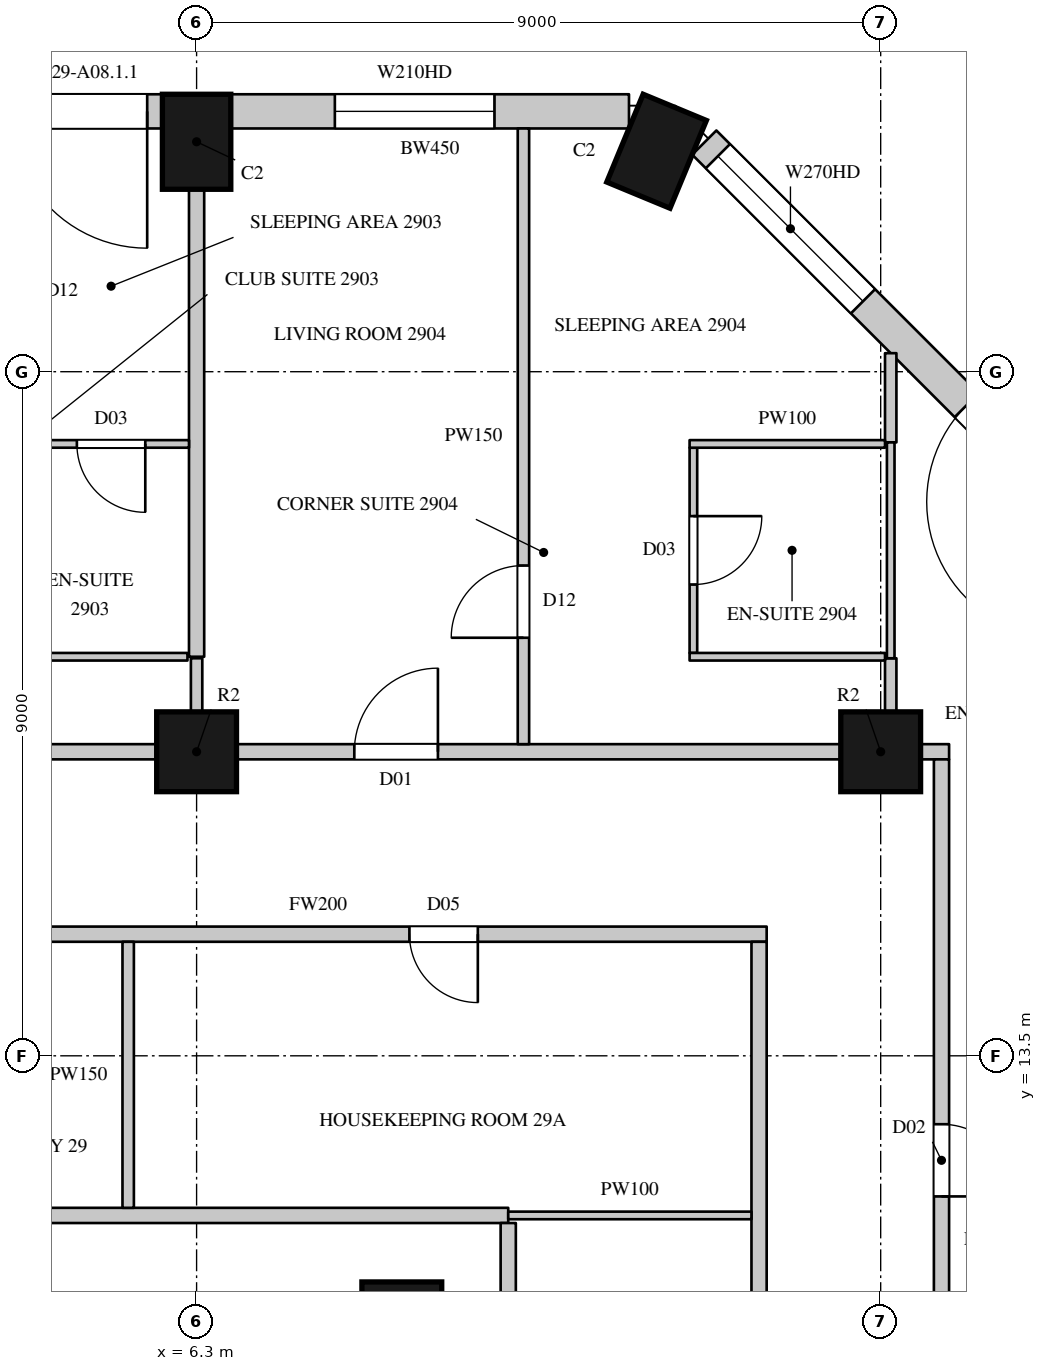
"""IFC4 building model, lengths in metres.
Left out: names, types, materials, properties, quantities, classifications, styles, units other than length and angle.
Written with IfcOpenShell. Run it as: python <this file> out.ifc"""

import sys

from ifc_helpers import new_model, si_unit, direction, frame, frame_2d, origin, origin_2d, place, context, subcontext, project, spatial, rectangle, circle, extrude, element, fill, save


model = new_model("IFC4")
c1 = context("Model", 3, precision=1e-05, world=origin(), true_north=direction((0.0, 1.0)))
c2 = subcontext(c1, "Body", "Model", "MODEL_VIEW")
j1 = project(units=[si_unit("LENGTHUNIT", "METRE"), si_unit("PLANEANGLEUNIT", "RADIAN")], contexts=[c1])
p1 = place(None, origin())
s1 = spatial("IfcSite", under=j1, at=p1, CompositionType="ELEMENT")
p2 = place(p1, origin())
s2 = spatial("IfcBuilding", under=s1, at=p2, CompositionType="ELEMENT")
p3 = place(p2, frame((0.0, 0.0, 134.7)))
s3 = spatial("IfcBuildingStorey", under=s2, at=p3, CompositionType="ELEMENT", Elevation=134.7)
for number, where, z_axis, x_axis in (
    (1, (12.352, 25.4, 0.0), (0.0, 0.0, 1.0), (-0.924, 0.383, 0.0)),
    (2, (6.3, 25.525, 0.0), (0.0, 0.0, 1.0), (-1.0, 0.0, 0.0)),
):
    element("IfcColumn", number, at=place(p3, frame(where, z_axis=z_axis, x_axis=x_axis)), inside=s3, PredefinedType="COLUMN", context=c2, shape_type="SweptSolid", body=[
        extrude(rectangle(XDim=0.9, YDim=1.25, at=origin_2d()), origin(), (0.0, 0.0, 1.0), 3.6),
    ])
for number, where, z_axis, x_axis in (
    (3, (6.3, 17.5, 0.0), (0.0, 0.0, 1.0), (1.0, 0.0, 0.0)),
    (4, (15.3, 17.5, 0.0), (0.0, 0.0, 1.0), (1.0, 0.0, 0.0)),
    (5, (9.0, 10.0, 0.0), (0.0, 0.0, 1.0), (1.0, 0.0, 0.0)),
):
    element("IfcColumn", number, at=place(p3, frame(where, z_axis=z_axis, x_axis=x_axis)), inside=s3, PredefinedType="COLUMN", context=c2, shape_type="SweptSolid", body=[
        extrude(circle(Radius=0.525, at=origin_2d()), origin(), (0.0, 0.0, 1.0), 3.6),
    ])
p4 = place(p3, frame((18.229, 20.265, 0.0), z_axis=(0.0, 0.0, 1.0), x_axis=(-0.707106781187, 0.707106781187, 0.0)))
e6 = element("IfcWall", 6, at=p4, inside=s3, PredefinedType="SOLIDWALL", context=c2, shape_type="SweptSolid", body=[
    extrude(rectangle(XDim=7.424, YDim=0.45, at=frame_2d((3.712, 0.0))), origin(), (0.0, 0.0, 1.0), 3.3),
])
p5 = place(p4, frame((0.74, 0.0, 0.0)))
e7 = element("IfcOpeningElement", 7, at=p5, cuts=e6, PredefinedType="OPENING", context=c2, shape_type="SweptSolid", body=[
    extrude(rectangle(XDim=1.8, YDim=2.4, at=frame_2d((0.9, 1.2))), frame((0.0, 0.235, 0.0), z_axis=(0.0, -1.0, 0.0), x_axis=(1.0, 0.0, 0.0)), (0.0, 0.0, 1.0), 0.47),
])
p6 = place(p4, frame((4.471, 0.0, 1.05)))
e8 = element("IfcOpeningElement", 8, at=p6, cuts=e6, PredefinedType="OPENING", context=c2, shape_type="SweptSolid", body=[
    extrude(rectangle(XDim=2.7, YDim=2.0, at=frame_2d((1.35, 1.0))), frame((0.0, 0.235, 0.0), z_axis=(0.0, -1.0, 0.0), x_axis=(1.0, 0.0, 0.0)), (0.0, 0.0, 1.0), 0.47),
])
p7 = place(p3, frame((11.989, 25.925, 0.0), z_axis=(0.0, 0.0, 1.0), x_axis=(-1.0, 0.0, 0.0)))
e9 = element("IfcWall", 9, at=p7, inside=s3, PredefinedType="SOLIDWALL", context=c2, shape_type="SweptSolid", body=[
    extrude(rectangle(XDim=5.239, YDim=0.45, at=frame_2d((2.619, 0.0))), origin(), (0.0, 0.0, 1.0), 3.3),
])
p8 = place(p7, frame((1.77, 0.0, 1.05)))
e10 = element("IfcOpeningElement", 10, at=p8, cuts=e9, PredefinedType="OPENING", context=c2, shape_type="SweptSolid", body=[
    extrude(rectangle(XDim=2.1, YDim=2.0, at=frame_2d((1.05, 1.0))), frame((0.0, 0.235, 0.0), z_axis=(0.0, -1.0, 0.0), x_axis=(1.0, 0.0, 0.0)), (0.0, 0.0, 1.0), 0.47),
])
p9 = place(p3, frame((5.85, 25.925, 0.0), z_axis=(0.0, 0.0, 1.0), x_axis=(-1.0, 0.0, 0.0)))
e11 = element("IfcWall", 11, at=p9, inside=s3, PredefinedType="SOLIDWALL", context=c2, shape_type="SweptSolid", body=[
    extrude(rectangle(XDim=8.1, YDim=0.45, at=frame_2d((4.05, 0.0))), origin(), (0.0, 0.0, 1.0), 3.3),
])
p10 = place(p9, frame((0.2, 0.0, 0.0)))
e12 = element("IfcOpeningElement", 12, at=p10, cuts=e11, PredefinedType="OPENING", context=c2, shape_type="SweptSolid", body=[
    extrude(rectangle(XDim=1.8, YDim=2.4, at=frame_2d((0.9, 1.2))), frame((0.0, 0.235, 0.0), z_axis=(0.0, -1.0, 0.0), x_axis=(1.0, 0.0, 0.0)), (0.0, 0.0, 1.0), 0.47),
])
p11 = place(p9, frame((2.2, 0.0, 1.05)))
e13 = element("IfcOpeningElement", 13, at=p11, cuts=e11, PredefinedType="OPENING", context=c2, shape_type="SweptSolid", body=[
    extrude(rectangle(XDim=1.2, YDim=2.0, at=frame_2d((0.6, 1.0))), frame((0.0, 0.235, 0.0), z_axis=(0.0, -1.0, 0.0), x_axis=(1.0, 0.0, 0.0)), (0.0, 0.0, 1.0), 0.47),
])
p12 = place(p9, frame((4.7, 0.0, 0.0)))
e14 = element("IfcOpeningElement", 14, at=p12, cuts=e11, PredefinedType="OPENING", context=c2, shape_type="SweptSolid", body=[
    extrude(rectangle(XDim=1.8, YDim=2.4, at=frame_2d((0.9, 1.2))), frame((0.0, 0.235, 0.0), z_axis=(0.0, -1.0, 0.0), x_axis=(1.0, 0.0, 0.0)), (0.0, 0.0, 1.0), 0.47),
])
p13 = place(p9, frame((6.7, 0.0, 1.05)))
e15 = element("IfcOpeningElement", 15, at=p13, cuts=e11, PredefinedType="OPENING", context=c2, shape_type="SweptSolid", body=[
    extrude(rectangle(XDim=1.2, YDim=2.0, at=frame_2d((0.6, 1.0))), frame((0.0, 0.235, 0.0), z_axis=(0.0, -1.0, 0.0), x_axis=(1.0, 0.0, 0.0)), (0.0, 0.0, 1.0), 0.47),
])
p14 = place(p3, frame((16.486, 23.529, 0.0), z_axis=(0.0, 0.0, 1.0), x_axis=(-0.707022305137, 0.707191247145, 0.0)))
e16 = element("IfcWall", 16, at=p14, inside=s3, PredefinedType="SOLIDWALL", context=c2, shape_type="SweptSolid", body=[
    extrude(rectangle(XDim=1.445, YDim=0.45, at=frame_2d((0.723, 0.0))), origin(), (0.0, 0.0, 1.0), 0.6),
])
p15 = place(p3, frame((-2.175, 17.5, 0.0), z_axis=(0.0, 0.0, 1.0), x_axis=(1.0, 0.0, 0.0)))
e17 = element("IfcWall", 17, at=p15, inside=s3, PredefinedType="PARTITIONING", context=c2, shape_type="SweptSolid", body=[
    extrude(rectangle(XDim=7.95, YDim=0.2, at=frame_2d((3.975, 0.0))), origin(), (0.0, 0.0, 1.0), 2.75),
])
p16 = place(p15, frame((4.55, 0.0, 0.0)))
e18 = element("IfcOpeningElement", 18, at=p16, cuts=e17, PredefinedType="OPENING", context=c2, shape_type="SweptSolid", body=[
    extrude(rectangle(XDim=1.1, YDim=2.4, at=frame_2d((0.55, 1.2))), frame((0.0, 0.11, 0.0), z_axis=(0.0, -1.0, 0.0), x_axis=(1.0, 0.0, 0.0)), (0.0, 0.0, 1.0), 0.22),
])
p17 = place(p3, frame((6.825, 17.5, 0.0), z_axis=(0.0, 0.0, 1.0), x_axis=(1.0, 0.0, 0.0)))
e19 = element("IfcWall", 19, at=p17, inside=s3, PredefinedType="PARTITIONING", context=c2, shape_type="SweptSolid", body=[
    extrude(rectangle(XDim=7.95, YDim=0.2, at=frame_2d((3.975, 0.0))), origin(), (0.0, 0.0, 1.0), 2.75),
])
p18 = place(p17, frame((1.55, 0.0, 0.0)))
e20 = element("IfcOpeningElement", 20, at=p18, cuts=e19, PredefinedType="OPENING", context=c2, shape_type="SweptSolid", body=[
    extrude(rectangle(XDim=1.1, YDim=2.4, at=frame_2d((0.55, 1.2))), frame((0.0, 0.11, 0.0), z_axis=(0.0, -1.0, 0.0), x_axis=(1.0, 0.0, 0.0)), (0.0, 0.0, 1.0), 0.22),
])
p19 = place(p3, frame((15.825, 17.5, 0.0), z_axis=(0.0, 0.0, 1.0), x_axis=(1.0, 0.0, 0.0)))
e21 = element("IfcWall", 21, at=p19, inside=s3, PredefinedType="PARTITIONING", context=c2, shape_type="SweptSolid", body=[
    extrude(rectangle(XDim=0.375, YDim=0.2, at=frame_2d((0.188, 0.0))), origin(), (0.0, 0.0, 1.0), 3.3),
])
p20 = place(p3, frame((-8.3, 11.4, 0.0), z_axis=(0.0, 0.0, 1.0), x_axis=(1.0, 0.0, 0.0)))
e22 = element("IfcWall", 22, at=p20, inside=s3, PredefinedType="PARTITIONING", context=c2, shape_type="SweptSolid", body=[
    extrude(rectangle(XDim=18.7, YDim=0.2, at=frame_2d((9.35, 0.0))), origin(), (0.0, 0.0, 1.0), 3.3),
])
p21 = place(p20, frame((6.9, 0.0, 0.0)))
e23 = element("IfcOpeningElement", 23, at=p21, cuts=e22, PredefinedType="OPENING", context=c2, shape_type="SweptSolid", body=[
    extrude(rectangle(XDim=1.5, YDim=2.2, at=frame_2d((0.75, 1.1))), frame((0.0, 0.11, 0.0), z_axis=(0.0, -1.0, 0.0), x_axis=(1.0, 0.0, 0.0)), (0.0, 0.0, 1.0), 0.22),
])
p22 = place(p3, frame((2.0, 15.1, 0.0), z_axis=(0.0, 0.0, 1.0), x_axis=(1.0, 0.0, 0.0)))
e24 = element("IfcWall", 24, at=p22, inside=s3, PredefinedType="PARTITIONING", context=c2, shape_type="SweptSolid", body=[
    extrude(rectangle(XDim=11.8, YDim=0.2, at=frame_2d((5.9, 0.0))), origin(), (0.0, 0.0, 1.0), 3.3),
])
p23 = place(p22, frame((7.1, 0.0, 0.0)))
e25 = element("IfcOpeningElement", 25, at=p23, cuts=e24, PredefinedType="OPENING", context=c2, shape_type="SweptSolid", body=[
    extrude(rectangle(XDim=0.9, YDim=2.2, at=frame_2d((0.45, 1.1))), frame((0.0, 0.11, 0.0), z_axis=(0.0, -1.0, 0.0), x_axis=(1.0, 0.0, 0.0)), (0.0, 0.0, 1.0), 0.22),
])
p24 = place(p3, frame((10.4, -11.3, 0.0), z_axis=(0.0, 0.0, 1.0), x_axis=(0.0, 1.0, 0.0)))
e26 = element("IfcWall", 26, at=p24, inside=s3, PredefinedType="PARTITIONING", context=c2, shape_type="SweptSolid", body=[
    extrude(rectangle(XDim=22.6, YDim=0.2, at=frame_2d((11.3, 0.0))), origin(), (0.0, 0.0, 1.0), 3.3),
])
p25 = place(p24, frame((16.3, 0.0, 0.0)))
e27 = element("IfcOpeningElement", 27, at=p25, cuts=e26, PredefinedType="OPENING", context=c2, shape_type="SweptSolid", body=[
    extrude(rectangle(XDim=1.5, YDim=2.2, at=frame_2d((0.75, 1.1))), frame((0.0, 0.11, 0.0), z_axis=(0.0, -1.0, 0.0), x_axis=(1.0, 0.0, 0.0)), (0.0, 0.0, 1.0), 0.22),
])
p26 = place(p24, frame((9.15, 0.0, 0.0)))
e28 = element("IfcOpeningElement", 28, at=p26, cuts=e26, PredefinedType="OPENING", context=c2, shape_type="SweptSolid", body=[
    extrude(rectangle(XDim=1.5, YDim=2.2, at=frame_2d((0.75, 1.1))), frame((0.0, 0.11, 0.0), z_axis=(0.0, -1.0, 0.0), x_axis=(1.0, 0.0, 0.0)), (0.0, 0.0, 1.0), 0.22),
])
p27 = place(p3, frame((13.7, 6.825, 0.0), z_axis=(0.0, 0.0, 1.0), x_axis=(0.0, 1.0, 0.0)))
e29 = element("IfcWall", 29, at=p27, inside=s3, PredefinedType="PARTITIONING", context=c2, shape_type="SweptSolid", body=[
    extrude(rectangle(XDim=8.175, YDim=0.2, at=frame_2d((4.087, 0.0))), origin(), (0.0, 0.0, 1.0), 3.3),
])
p28 = place(p3, frame((16.1, 4.75, 0.0), z_axis=(0.0, 0.0, 1.0), x_axis=(0.0, 1.0, 0.0)))
e30 = element("IfcWall", 30, at=p28, inside=s3, PredefinedType="PARTITIONING", context=c2, shape_type="SweptSolid", body=[
    extrude(rectangle(XDim=12.65, YDim=0.2, at=frame_2d((6.325, 0.0))), origin(), (0.0, 0.0, 1.0), 3.3),
])
p29 = place(p28, frame((0.5, 0.0, 0.0)))
e31 = element("IfcOpeningElement", 31, at=p29, cuts=e30, PredefinedType="OPENING", context=c2, shape_type="SweptSolid", body=[
    extrude(rectangle(XDim=0.95, YDim=2.2, at=frame_2d((0.475, 1.1))), frame((0.0, 0.11, 0.0), z_axis=(0.0, -1.0, 0.0), x_axis=(1.0, 0.0, 0.0)), (0.0, 0.0, 1.0), 0.22),
])
p30 = place(p28, frame((6.9, 0.0, 0.0)))
e32 = element("IfcOpeningElement", 32, at=p30, cuts=e30, PredefinedType="OPENING", context=c2, shape_type="SweptSolid", body=[
    extrude(rectangle(XDim=0.95, YDim=2.2, at=frame_2d((0.475, 1.1))), frame((0.0, 0.11, 0.0), z_axis=(0.0, -1.0, 0.0), x_axis=(1.0, 0.0, 0.0)), (0.0, 0.0, 1.0), 0.22),
])
p31 = place(p3, frame((5.4, 11.5, 0.0), z_axis=(0.0, 0.0, 1.0), x_axis=(0.0, 1.0, 0.0)))
e33 = element("IfcWall", 33, at=p31, inside=s3, PredefinedType="PARTITIONING", context=c2, shape_type="SweptSolid", body=[
    extrude(rectangle(XDim=3.5, YDim=0.15, at=frame_2d((1.75, 0.0))), origin(), (0.0, 0.0, 1.0), 3.3),
])
p32 = place(p3, frame((6.3, 18.025, 0.0), z_axis=(0.0, 0.0, 1.0), x_axis=(0.0, 1.0, 0.0)))
e34 = element("IfcWall", 34, at=p32, inside=s3, PredefinedType="PARTITIONING", context=c2, shape_type="SweptSolid", body=[
    extrude(rectangle(XDim=0.705, YDim=0.15, at=frame_2d((0.353, 0.0))), origin(), (0.0, 0.0, 1.0), 2.75),
])
p33 = place(p3, frame((10.6, 17.6, 0.0), z_axis=(0.0, 0.0, 1.0), x_axis=(0.0, 1.0, 0.0)))
e35 = element("IfcWall", 35, at=p33, inside=s3, PredefinedType="PARTITIONING", context=c2, shape_type="SweptSolid", body=[
    extrude(rectangle(XDim=8.1, YDim=0.15, at=frame_2d((4.05, 0.0))), origin(), (0.0, 0.0, 1.0), 3.3),
])
p34 = place(p33, frame((1.4, 0.0, 0.0)))
e36 = element("IfcOpeningElement", 36, at=p34, cuts=e35, PredefinedType="OPENING", context=c2, shape_type="SweptSolid", body=[
    extrude(rectangle(XDim=0.95, YDim=2.2, at=frame_2d((0.475, 1.1))), frame((0.0, 0.085, 0.0), z_axis=(0.0, -1.0, 0.0), x_axis=(1.0, 0.0, 0.0)), (0.0, 0.0, 1.0), 0.17),
])
p35 = place(p3, frame((15.432, 18.016, 0.0), z_axis=(0.0, 0.0, 1.0), x_axis=(0.0, 1.0, 0.0)))
e37 = element("IfcWall", 37, at=p35, inside=s3, PredefinedType="PARTITIONING", context=c2, shape_type="SweptSolid", body=[
    extrude(rectangle(XDim=0.714, YDim=0.15, at=frame_2d((0.357, 0.0))), origin(), (0.0, 0.0, 1.0), 3.3),
])
p36 = place(p3, frame((15.432, 21.57, 0.0), z_axis=(0.0, 0.0, 1.0), x_axis=(0.0, 1.0, 0.0)))
e38 = element("IfcWall", 38, at=p36, inside=s3, PredefinedType="PARTITIONING", context=c2, shape_type="SweptSolid", body=[
    extrude(rectangle(XDim=1.174, YDim=0.15, at=frame_2d((0.587, 0.0))), origin(), (0.0, 0.0, 1.0), 3.3),
])
p37 = place(p3, frame((6.3, 18.75, 0.0), z_axis=(0.0, 0.0, 1.0), x_axis=(0.0, 1.0, 0.0)))
e39 = element("IfcWall", 39, at=p37, inside=s3, PredefinedType="PARTITIONING", context=c2, shape_type="SweptSolid", body=[
    extrude(rectangle(XDim=6.15, YDim=0.2, at=frame_2d((3.075, 0.0))), origin(), (0.0, 0.0, 1.0), 2.75),
])
p38 = place(p3, frame((4.125, 21.55, 0.0), z_axis=(0.0, 0.0, 1.0), x_axis=(1.0, 0.0, 0.0)))
e40 = element("IfcWall", 40, at=p38, inside=s3, PredefinedType="PARTITIONING", context=c2, shape_type="SweptSolid", body=[
    extrude(rectangle(XDim=2.075, YDim=0.1, at=frame_2d((1.038, 0.0))), origin(), (0.0, 0.0, 1.0), 3.3),
])
p39 = place(p38, frame((0.6, 0.0, 0.0)))
e41 = element("IfcOpeningElement", 41, at=p39, cuts=e40, PredefinedType="OPENING", context=c2, shape_type="SweptSolid", body=[
    extrude(rectangle(XDim=0.9, YDim=2.2, at=frame_2d((0.45, 1.1))), frame((0.0, 0.06, 0.0), z_axis=(0.0, -1.0, 0.0), x_axis=(1.0, 0.0, 0.0)), (0.0, 0.0, 1.0), 0.12),
])
p40 = place(p3, frame((4.07, 18.75, 0.0), z_axis=(0.0, 0.0, 1.0), x_axis=(1.0, 0.0, 0.0)))
e42 = element("IfcWall", 42, at=p40, inside=s3, PredefinedType="PARTITIONING", context=c2, shape_type="SweptSolid", body=[
    extrude(rectangle(XDim=2.11, YDim=0.1, at=frame_2d((1.055, 0.0))), origin(), (0.0, 0.0, 1.0), 3.3),
])
p41 = place(p3, frame((10.4, 11.4, 0.0), z_axis=(0.0, 0.0, 1.0), x_axis=(1.0, 0.0, 0.0)))
e43 = element("IfcWall", 43, at=p41, inside=s3, PredefinedType="PARTITIONING", context=c2, shape_type="SweptSolid", body=[
    extrude(rectangle(XDim=3.2, YDim=0.1, at=frame_2d((1.6, 0.0))), origin(), (0.0, 0.0, 1.0), 3.3),
])
p42 = place(p3, frame((12.836, 18.8, 0.0), z_axis=(0.0, 0.0, 1.0), x_axis=(0.0, 1.0, 0.0)))
e44 = element("IfcWall", 44, at=p42, inside=s3, PredefinedType="PARTITIONING", context=c2, shape_type="SweptSolid", body=[
    extrude(rectangle(XDim=2.7, YDim=0.1, at=frame_2d((1.35, 0.0))), origin(), (0.0, 0.0, 1.0), 3.3),
])
p43 = place(p42, frame((0.9, 0.0, 0.0)))
e45 = element("IfcOpeningElement", 45, at=p43, cuts=e44, PredefinedType="OPENING", context=c2, shape_type="SweptSolid", body=[
    extrude(rectangle(XDim=0.9, YDim=2.2, at=frame_2d((0.45, 1.1))), frame((0.0, 0.06, 0.0), z_axis=(0.0, -1.0, 0.0), x_axis=(1.0, 0.0, 0.0)), (0.0, 0.0, 1.0), 0.12),
])
for number, where, z_axis, x_axis in (
    (46, (12.786, 18.75, 0.0), (0.0, 0.0, 1.0), (1.0, 0.0, 0.0)),
    (47, (12.786, 21.55, 0.0), (0.0, 0.0, 1.0), (1.0, 0.0, 0.0)),
):
    element("IfcWall", number, at=place(p3, frame(where, z_axis=z_axis, x_axis=x_axis)), inside=s3, PredefinedType="PARTITIONING", context=c2, shape_type="SweptSolid", body=[
        extrude(rectangle(XDim=2.571, YDim=0.1, at=frame_2d((1.286, 0.0))), origin(), (0.0, 0.0, 1.0), 3.3),
    ])
p44 = place(p3, frame((15.432, 18.73, 0.0), z_axis=(0.0, 0.0, 1.0), x_axis=(0.0, 1.0, 0.0)))
e48 = element("IfcWall", 48, at=p44, inside=s3, PredefinedType="PARTITIONING", context=c2, shape_type="SweptSolid", body=[
    extrude(rectangle(XDim=2.84, YDim=0.1, at=frame_2d((1.42, 0.0))), origin(), (0.0, 0.0, 1.0), 3.3),
])
p45 = place(p5, origin())
e49 = element("IfcDoor", 49, at=p45, inside=s3, OperationType="SLIDING_TO_LEFT", PredefinedType="DOOR", context=c2, shape_type="SweptSolid", body=[
    extrude(rectangle(XDim=1.8, YDim=2.4, at=frame_2d((0.9, 1.2))), frame((0.0, 0.13, 0.0), z_axis=(0.0, -1.0, 0.0), x_axis=(1.0, 0.0, 0.0)), (0.0, 0.0, 1.0), 0.05),
])
fill(e7, e49)
p46 = place(p6, origin())
e50 = element("IfcWindow", 50, at=p46, inside=s3, PartitioningType="SINGLE_PANEL", PredefinedType="WINDOW", context=c2, shape_type="SweptSolid", body=[
    extrude(rectangle(XDim=2.7, YDim=2.0, at=frame_2d((1.35, 1.0))), frame((0.0, 0.135, 0.0), z_axis=(0.0, -1.0, 0.0), x_axis=(1.0, 0.0, 0.0)), (0.0, 0.0, 1.0), 0.06),
])
fill(e8, e50)
p47 = place(p10, origin())
e51 = element("IfcDoor", 51, at=p47, inside=s3, OperationType="SLIDING_TO_LEFT", PredefinedType="DOOR", context=c2, shape_type="SweptSolid", body=[
    extrude(rectangle(XDim=1.8, YDim=2.4, at=frame_2d((0.9, 1.2))), frame((0.0, 0.13, 0.0), z_axis=(0.0, -1.0, 0.0), x_axis=(1.0, 0.0, 0.0)), (0.0, 0.0, 1.0), 0.05),
])
fill(e12, e51)
p48 = place(p23, origin())
e52 = element("IfcDoor", 52, at=p48, inside=s3, OperationType="SINGLE_SWING_LEFT", PredefinedType="DOOR", context=c2, shape_type="SweptSolid", body=[
    extrude(rectangle(XDim=0.9, YDim=2.2, at=frame_2d((0.45, 1.1))), frame((0.0, 0.025, 0.0), z_axis=(0.0, -1.0, 0.0), x_axis=(1.0, 0.0, 0.0)), (0.0, 0.0, 1.0), 0.05),
])
fill(e25, e52)
p49 = place(p39, origin())
e53 = element("IfcDoor", 53, at=p49, inside=s3, OperationType="SINGLE_SWING_LEFT", PredefinedType="DOOR", context=c2, shape_type="SweptSolid", body=[
    extrude(rectangle(XDim=0.9, YDim=2.2, at=frame_2d((0.45, 1.1))), frame((0.0, 0.025, 0.0), z_axis=(0.0, -1.0, 0.0), x_axis=(1.0, 0.0, 0.0)), (0.0, 0.0, 1.0), 0.05),
])
fill(e41, e53)
p50 = place(p18, origin())
e54 = element("IfcDoor", 54, at=p50, inside=s3, OperationType="SINGLE_SWING_RIGHT", PredefinedType="DOOR", context=c2, shape_type="SweptSolid", body=[
    extrude(rectangle(XDim=1.1, YDim=2.4, at=frame_2d((0.55, 1.2))), frame((0.0, 0.025, 0.0), z_axis=(0.0, -1.0, 0.0), x_axis=(1.0, 0.0, 0.0)), (0.0, 0.0, 1.0), 0.05),
])
fill(e20, e54)
p51 = place(p34, origin())
e55 = element("IfcDoor", 55, at=p51, inside=s3, OperationType="SINGLE_SWING_LEFT", PredefinedType="DOOR", context=c2, shape_type="SweptSolid", body=[
    extrude(rectangle(XDim=0.95, YDim=2.2, at=frame_2d((0.475, 1.1))), frame((0.0, 0.025, 0.0), z_axis=(0.0, -1.0, 0.0), x_axis=(1.0, 0.0, 0.0)), (0.0, 0.0, 1.0), 0.05),
])
fill(e36, e55)
p52 = place(p43, origin())
e56 = element("IfcDoor", 56, at=p52, inside=s3, OperationType="SINGLE_SWING_LEFT", PredefinedType="DOOR", context=c2, shape_type="SweptSolid", body=[
    extrude(rectangle(XDim=0.9, YDim=2.2, at=frame_2d((0.45, 1.1))), frame((0.0, 0.025, 0.0), z_axis=(0.0, -1.0, 0.0), x_axis=(1.0, 0.0, 0.0)), (0.0, 0.0, 1.0), 0.05),
])
fill(e45, e56)
p53 = place(p30, origin())
e57 = element("IfcDoor", 57, at=p53, inside=s3, OperationType="SINGLE_SWING_RIGHT", PredefinedType="DOOR", context=c2, shape_type="SweptSolid", body=[
    extrude(rectangle(XDim=0.95, YDim=2.2, at=frame_2d((0.475, 1.1))), frame((0.0, 0.025, 0.0), z_axis=(0.0, -1.0, 0.0), x_axis=(1.0, 0.0, 0.0)), (0.0, 0.0, 1.0), 0.05),
])
fill(e32, e57)
p54 = place(p8, origin())
e58 = element("IfcWindow", 58, at=p54, inside=s3, PartitioningType="SINGLE_PANEL", PredefinedType="WINDOW", context=c2, shape_type="SweptSolid", body=[
    extrude(rectangle(XDim=2.1, YDim=2.0, at=frame_2d((1.05, 1.0))), frame((0.0, 0.135, 0.0), z_axis=(0.0, -1.0, 0.0), x_axis=(1.0, 0.0, 0.0)), (0.0, 0.0, 1.0), 0.06),
])
fill(e10, e58)
save(model, sys.argv[1])
